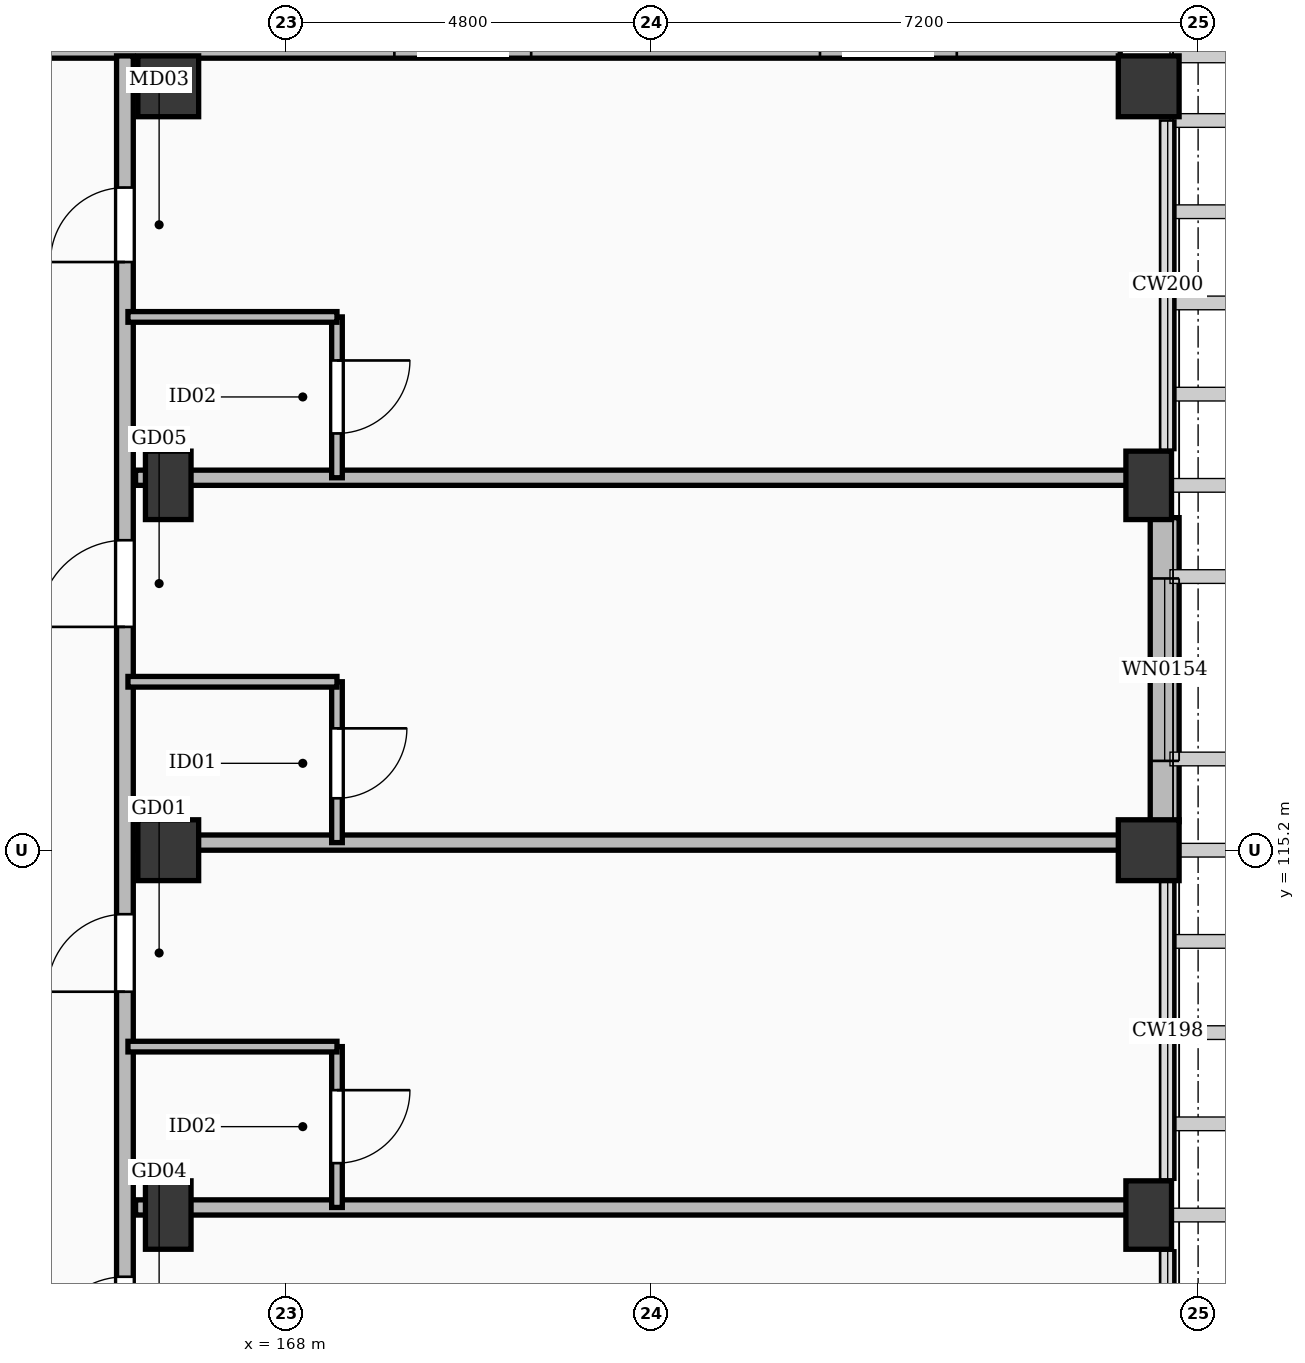
"""IFC4 building model, lengths in metres.
Left out: names, types, materials, properties, quantities, classifications, styles, units other than length and angle.
Written with IfcOpenShell. Run it as: python <this file> out.ifc"""

import sys

from ifc_helpers import new_model, si_unit, direction, frame, frame_2d, origin, origin_2d, place, context, subcontext, project, spatial, rectangle, extrude, element, fill, save


model = new_model("IFC4")
c1 = context("Model", 3, precision=1e-05, world=origin(), true_north=direction((0.0, 1.0)))
c2 = subcontext(c1, "Body", "Model", "MODEL_VIEW")
j1 = project(units=[si_unit("LENGTHUNIT", "METRE"), si_unit("PLANEANGLEUNIT", "RADIAN")], contexts=[c1])
p1 = place(None, origin())
s1 = spatial("IfcSite", under=j1, at=p1, CompositionType="ELEMENT")
p2 = place(p1, origin())
s2 = spatial("IfcBuilding", under=s1, at=p2, CompositionType="ELEMENT")
p3 = place(p2, frame((0.0, 0.0, 21.0)))
s3 = spatial("IfcBuildingStorey", under=s2, at=p3, CompositionType="ELEMENT", Elevation=21.0)
for number, where, z_axis, x_axis in (
    (1, (166.45, 115.2, 0.0), (0.0, 0.0, 1.0), (1.0, 0.0, 0.0)),
    (2, (166.45, 125.25, 0.0), (0.0, 0.0, 1.0), (1.0, 0.0, 0.0)),
    (3, (179.35, 115.2, 0.0), (0.0, 0.0, 1.0), (1.0, 0.0, 0.0)),
    (4, (179.35, 125.25, 0.0), (0.0, 0.0, 1.0), (1.0, 0.0, 0.0)),
):
    element("IfcColumn", number, at=place(p3, frame(where, z_axis=z_axis, x_axis=x_axis)), inside=s3, PredefinedType="COLUMN", context=c2, shape_type="SweptSolid", body=[
        extrude(rectangle(XDim=0.8, YDim=0.8, at=origin_2d()), origin(), (0.0, 0.0, 1.0), 3.6),
    ])
for number, where, z_axis, x_axis in (
    (5, (166.45, 110.4, -0.26), (0.0, 0.0, 1.0), (1.0, 0.0, 0.0)),
    (6, (166.45, 120.0, -0.26), (0.0, 0.0, 1.0), (1.0, 0.0, 0.0)),
    (7, (179.35, 110.4, -0.26), (0.0, 0.0, 1.0), (1.0, 0.0, 0.0)),
    (8, (179.35, 120.0, -0.26), (0.0, 0.0, 1.0), (1.0, 0.0, 0.0)),
):
    element("IfcColumn", number, at=place(p3, frame(where, z_axis=z_axis, x_axis=x_axis)), inside=s3, PredefinedType="COLUMN", context=c2, shape_type="SweptSolid", body=[
        extrude(rectangle(XDim=0.6, YDim=0.9, at=origin_2d()), origin(), (0.0, 0.0, 1.0), 3.86),
    ])
p4 = place(p3, frame((149.825, 125.81, 0.0), z_axis=(0.0, 0.0, 1.0), x_axis=(1.0, 0.0, 0.0)))
e9 = element("IfcWall", 9, at=p4, inside=s3, PredefinedType="SOLIDWALL", context=c2, shape_type="SweptSolid", body=[
    extrude(rectangle(XDim=29.15, YDim=0.38, at=frame_2d((14.575, 0.0))), origin(), (0.0, 0.0, 1.0), 3.34),
])
p5 = place(p4, frame((3.6, 0.0, 0.55)))
e10 = element("IfcOpeningElement", 10, at=p5, cuts=e9, PredefinedType="OPENING", context=c2, shape_type="SweptSolid", body=[
    extrude(rectangle(XDim=1.8, YDim=1.76, at=frame_2d((0.9, 0.88))), frame((0.0, 0.202, 0.0), z_axis=(0.0, -1.0, 0.0), x_axis=(1.0, 0.0, 0.0)), (0.0, 0.0, 1.0), 0.404),
])
p6 = place(p4, frame((9.2, 0.0, 0.55)))
e11 = element("IfcOpeningElement", 11, at=p6, cuts=e9, PredefinedType="OPENING", context=c2, shape_type="SweptSolid", body=[
    extrude(rectangle(XDim=1.8, YDim=1.76, at=frame_2d((0.9, 0.88))), frame((0.0, 0.202, 0.0), z_axis=(0.0, -1.0, 0.0), x_axis=(1.0, 0.0, 0.0)), (0.0, 0.0, 1.0), 0.404),
])
p7 = place(p4, frame((19.6, 0.0, 0.55)))
e12 = element("IfcOpeningElement", 12, at=p7, cuts=e9, PredefinedType="OPENING", context=c2, shape_type="SweptSolid", body=[
    extrude(rectangle(XDim=1.8, YDim=1.76, at=frame_2d((0.9, 0.88))), frame((0.0, 0.202, 0.0), z_axis=(0.0, -1.0, 0.0), x_axis=(1.0, 0.0, 0.0)), (0.0, 0.0, 1.0), 0.404),
])
p8 = place(p4, frame((25.2, 0.0, 0.55)))
e13 = element("IfcOpeningElement", 13, at=p8, cuts=e9, PredefinedType="OPENING", context=c2, shape_type="SweptSolid", body=[
    extrude(rectangle(XDim=1.8, YDim=1.76, at=frame_2d((0.9, 0.88))), frame((0.0, 0.202, 0.0), z_axis=(0.0, -1.0, 0.0), x_axis=(1.0, 0.0, 0.0)), (0.0, 0.0, 1.0), 0.404),
])
p9 = place(p3, frame((179.56, 119.575, 0.0), z_axis=(0.0, 0.0, 1.0), x_axis=(0.0, -1.0, 0.0)))
e14 = element("IfcWall", 14, at=p9, inside=s3, PredefinedType="SOLIDWALL", context=c2, shape_type="SweptSolid", body=[
    extrude(rectangle(XDim=4.0, YDim=0.38, at=frame_2d((2.0, 0.0))), origin(), (0.0, 0.0, 1.0), 2.582),
])
p10 = place(p9, frame((0.8, 0.0, 0.55)))
e15 = element("IfcOpeningElement", 15, at=p10, cuts=e14, PredefinedType="OPENING", context=c2, shape_type="SweptSolid", body=[
    extrude(rectangle(XDim=2.4, YDim=1.8, at=frame_2d((1.2, 0.9))), frame((0.0, 0.202, 0.0), z_axis=(0.0, -1.0, 0.0), x_axis=(1.0, 0.0, 0.0)), (0.0, 0.0, 1.0), 0.404),
])
p11 = place(p3, frame((165.88, 65.4, 0.0), z_axis=(0.0, 0.0, 1.0), x_axis=(0.0, 1.0, 0.0)))
e16 = element("IfcWall", 16, at=p11, inside=s3, PredefinedType="PARTITIONING", context=c2, shape_type="SweptSolid", body=[
    extrude(rectangle(XDim=60.25, YDim=0.22, at=frame_2d((30.125, 0.0))), origin(), (0.0, 0.0, 1.0), 2.582),
])
p12 = place(p11, frame((4.388, 0.0, 0.0)))
e17 = element("IfcOpeningElement", 17, at=p12, cuts=e16, PredefinedType="OPENING", context=c2, shape_type="SweptSolid", body=[
    extrude(rectangle(XDim=1.28, YDim=2.16, at=frame_2d((0.64, 1.08))), frame((0.0, 0.122, 0.0), z_axis=(0.0, -1.0, 0.0), x_axis=(1.0, 0.0, 0.0)), (0.0, 0.0, 1.0), 0.244),
])
p13 = place(p11, frame((9.538, 0.0, 0.0)))
e18 = element("IfcOpeningElement", 18, at=p13, cuts=e16, PredefinedType="OPENING", context=c2, shape_type="SweptSolid", body=[
    extrude(rectangle(XDim=0.9, YDim=2.08, at=frame_2d((0.45, 1.04))), frame((0.0, 0.122, 0.0), z_axis=(0.0, -1.0, 0.0), x_axis=(1.0, 0.0, 0.0)), (0.0, 0.0, 1.0), 0.244),
])
p14 = place(p11, frame((14.338, 0.0, 0.0)))
e19 = element("IfcOpeningElement", 19, at=p14, cuts=e16, PredefinedType="OPENING", context=c2, shape_type="SweptSolid", body=[
    extrude(rectangle(XDim=1.05, YDim=2.22, at=frame_2d((0.525, 1.11))), frame((0.0, 0.122, 0.0), z_axis=(0.0, -1.0, 0.0), x_axis=(1.0, 0.0, 0.0)), (0.0, 0.0, 1.0), 0.244),
])
p15 = place(p11, frame((19.138, 0.0, 0.0)))
e20 = element("IfcOpeningElement", 20, at=p15, cuts=e16, PredefinedType="OPENING", context=c2, shape_type="SweptSolid", body=[
    extrude(rectangle(XDim=1.02, YDim=2.2, at=frame_2d((0.51, 1.1))), frame((0.0, 0.122, 0.0), z_axis=(0.0, -1.0, 0.0), x_axis=(1.0, 0.0, 0.0)), (0.0, 0.0, 1.0), 0.244),
])
p16 = place(p11, frame((23.938, 0.0, 0.0)))
e21 = element("IfcOpeningElement", 21, at=p16, cuts=e16, PredefinedType="OPENING", context=c2, shape_type="SweptSolid", body=[
    extrude(rectangle(XDim=1.14, YDim=2.26, at=frame_2d((0.57, 1.13))), frame((0.0, 0.122, 0.0), z_axis=(0.0, -1.0, 0.0), x_axis=(1.0, 0.0, 0.0)), (0.0, 0.0, 1.0), 0.244),
])
p17 = place(p11, frame((28.738, 0.0, 0.0)))
e22 = element("IfcOpeningElement", 22, at=p17, cuts=e16, PredefinedType="OPENING", context=c2, shape_type="SweptSolid", body=[
    extrude(rectangle(XDim=0.98, YDim=2.15, at=frame_2d((0.49, 1.075))), frame((0.0, 0.122, 0.0), z_axis=(0.0, -1.0, 0.0), x_axis=(1.0, 0.0, 0.0)), (0.0, 0.0, 1.0), 0.244),
])
p18 = place(p11, frame((33.188, 0.0, 0.0)))
e23 = element("IfcOpeningElement", 23, at=p18, cuts=e16, PredefinedType="OPENING", context=c2, shape_type="SweptSolid", body=[
    extrude(rectangle(XDim=1.28, YDim=2.16, at=frame_2d((0.64, 1.08))), frame((0.0, 0.122, 0.0), z_axis=(0.0, -1.0, 0.0), x_axis=(1.0, 0.0, 0.0)), (0.0, 0.0, 1.0), 0.244),
])
p19 = place(p11, frame((38.338, 0.0, 0.0)))
e24 = element("IfcOpeningElement", 24, at=p19, cuts=e16, PredefinedType="OPENING", context=c2, shape_type="SweptSolid", body=[
    extrude(rectangle(XDim=0.9, YDim=2.08, at=frame_2d((0.45, 1.04))), frame((0.0, 0.122, 0.0), z_axis=(0.0, -1.0, 0.0), x_axis=(1.0, 0.0, 0.0)), (0.0, 0.0, 1.0), 0.244),
])
p20 = place(p11, frame((43.138, 0.0, 0.0)))
e25 = element("IfcOpeningElement", 25, at=p20, cuts=e16, PredefinedType="OPENING", context=c2, shape_type="SweptSolid", body=[
    extrude(rectangle(XDim=1.05, YDim=2.22, at=frame_2d((0.525, 1.11))), frame((0.0, 0.122, 0.0), z_axis=(0.0, -1.0, 0.0), x_axis=(1.0, 0.0, 0.0)), (0.0, 0.0, 1.0), 0.244),
])
p21 = place(p11, frame((47.938, 0.0, 0.0)))
e26 = element("IfcOpeningElement", 26, at=p21, cuts=e16, PredefinedType="OPENING", context=c2, shape_type="SweptSolid", body=[
    extrude(rectangle(XDim=1.02, YDim=2.2, at=frame_2d((0.51, 1.1))), frame((0.0, 0.122, 0.0), z_axis=(0.0, -1.0, 0.0), x_axis=(1.0, 0.0, 0.0)), (0.0, 0.0, 1.0), 0.244),
])
p22 = place(p11, frame((52.738, 0.0, 0.0)))
e27 = element("IfcOpeningElement", 27, at=p22, cuts=e16, PredefinedType="OPENING", context=c2, shape_type="SweptSolid", body=[
    extrude(rectangle(XDim=1.14, YDim=2.26, at=frame_2d((0.57, 1.13))), frame((0.0, 0.122, 0.0), z_axis=(0.0, -1.0, 0.0), x_axis=(1.0, 0.0, 0.0)), (0.0, 0.0, 1.0), 0.244),
])
p23 = place(p11, frame((57.538, 0.0, 0.0)))
e28 = element("IfcOpeningElement", 28, at=p23, cuts=e16, PredefinedType="OPENING", context=c2, shape_type="SweptSolid", body=[
    extrude(rectangle(XDim=0.98, YDim=2.15, at=frame_2d((0.49, 1.075))), frame((0.0, 0.122, 0.0), z_axis=(0.0, -1.0, 0.0), x_axis=(1.0, 0.0, 0.0)), (0.0, 0.0, 1.0), 0.244),
])
p24 = place(p3, frame((166.02, 110.5, 0.0), z_axis=(0.0, 0.0, 1.0), x_axis=(1.0, 0.0, 0.0)))
e29 = element("IfcWall", 29, at=p24, inside=s3, PredefinedType="PARTITIONING", context=c2, shape_type="SweptSolid", body=[
    extrude(rectangle(XDim=13.23, YDim=0.2, at=frame_2d((6.615, 0.0))), origin(), (0.0, 0.0, 1.0), 2.582),
])
p25 = place(p3, frame((168.67, 110.5, 0.0), z_axis=(0.0, 0.0, 1.0), x_axis=(0.0, 1.0, 0.0)))
e30 = element("IfcWall", 30, at=p25, inside=s3, PredefinedType="PARTITIONING", context=c2, shape_type="SweptSolid", body=[
    extrude(rectangle(XDim=2.116, YDim=0.14, at=frame_2d((1.058, 0.0))), origin(), (0.0, 0.0, 1.0), 2.652),
])
p26 = place(p25, frame((0.583, 0.0, 0.0)))
e31 = element("IfcOpeningElement", 31, at=p26, cuts=e30, PredefinedType="OPENING", context=c2, shape_type="SweptSolid", body=[
    extrude(rectangle(XDim=0.96, YDim=2.12, at=frame_2d((0.48, 1.06))), frame((0.0, 0.082, 0.0), z_axis=(0.0, -1.0, 0.0), x_axis=(1.0, 0.0, 0.0)), (0.0, 0.0, 1.0), 0.164),
])
p27 = place(p3, frame((165.92, 112.616, 0.0), z_axis=(0.0, 0.0, 1.0), x_axis=(1.0, 0.0, 0.0)))
e32 = element("IfcWall", 32, at=p27, inside=s3, PredefinedType="PARTITIONING", context=c2, shape_type="SweptSolid", body=[
    extrude(rectangle(XDim=2.75, YDim=0.14, at=frame_2d((1.375, 0.0))), origin(), (0.0, 0.0, 1.0), 2.652),
])
p28 = place(p3, frame((166.02, 115.3, 0.0), z_axis=(0.0, 0.0, 1.0), x_axis=(1.0, 0.0, 0.0)))
e33 = element("IfcWall", 33, at=p28, inside=s3, PredefinedType="PARTITIONING", context=c2, shape_type="SweptSolid", body=[
    extrude(rectangle(XDim=13.23, YDim=0.2, at=frame_2d((6.615, 0.0))), origin(), (0.0, 0.0, 1.0), 2.582),
])
p29 = place(p3, frame((168.67, 115.3, 0.0), z_axis=(0.0, 0.0, 1.0), x_axis=(0.0, 1.0, 0.0)))
e34 = element("IfcWall", 34, at=p29, inside=s3, PredefinedType="PARTITIONING", context=c2, shape_type="SweptSolid", body=[
    extrude(rectangle(XDim=2.116, YDim=0.14, at=frame_2d((1.058, 0.0))), origin(), (0.0, 0.0, 1.0), 2.652),
])
p30 = place(p29, frame((0.583, 0.0, 0.0)))
e35 = element("IfcOpeningElement", 35, at=p30, cuts=e34, PredefinedType="OPENING", context=c2, shape_type="SweptSolid", body=[
    extrude(rectangle(XDim=0.92, YDim=2.1, at=frame_2d((0.46, 1.05))), frame((0.0, 0.082, 0.0), z_axis=(0.0, -1.0, 0.0), x_axis=(1.0, 0.0, 0.0)), (0.0, 0.0, 1.0), 0.164),
])
p31 = place(p3, frame((165.92, 117.416, 0.0), z_axis=(0.0, 0.0, 1.0), x_axis=(1.0, 0.0, 0.0)))
e36 = element("IfcWall", 36, at=p31, inside=s3, PredefinedType="PARTITIONING", context=c2, shape_type="SweptSolid", body=[
    extrude(rectangle(XDim=2.75, YDim=0.14, at=frame_2d((1.375, 0.0))), origin(), (0.0, 0.0, 1.0), 2.652),
])
p32 = place(p3, frame((166.02, 120.1, 0.0), z_axis=(0.0, 0.0, 1.0), x_axis=(1.0, 0.0, 0.0)))
e37 = element("IfcWall", 37, at=p32, inside=s3, PredefinedType="PARTITIONING", context=c2, shape_type="SweptSolid", body=[
    extrude(rectangle(XDim=13.23, YDim=0.2, at=frame_2d((6.615, 0.0))), origin(), (0.0, 0.0, 1.0), 2.582),
])
p33 = place(p3, frame((168.67, 120.1, 0.0), z_axis=(0.0, 0.0, 1.0), x_axis=(0.0, 1.0, 0.0)))
e38 = element("IfcWall", 38, at=p33, inside=s3, PredefinedType="PARTITIONING", context=c2, shape_type="SweptSolid", body=[
    extrude(rectangle(XDim=2.116, YDim=0.14, at=frame_2d((1.058, 0.0))), origin(), (0.0, 0.0, 1.0), 2.652),
])
p34 = place(p33, frame((0.583, 0.0, 0.0)))
e39 = element("IfcOpeningElement", 39, at=p34, cuts=e38, PredefinedType="OPENING", context=c2, shape_type="SweptSolid", body=[
    extrude(rectangle(XDim=0.96, YDim=2.12, at=frame_2d((0.48, 1.06))), frame((0.0, 0.082, 0.0), z_axis=(0.0, -1.0, 0.0), x_axis=(1.0, 0.0, 0.0)), (0.0, 0.0, 1.0), 0.164),
])
p35 = place(p3, frame((165.92, 122.216, 0.0), z_axis=(0.0, 0.0, 1.0), x_axis=(1.0, 0.0, 0.0)))
e40 = element("IfcWall", 40, at=p35, inside=s3, PredefinedType="PARTITIONING", context=c2, shape_type="SweptSolid", body=[
    extrude(rectangle(XDim=2.75, YDim=0.14, at=frame_2d((1.375, 0.0))), origin(), (0.0, 0.0, 1.0), 2.652),
])
p36 = place(p10, origin())
e41 = element("IfcWindow", 41, at=p36, inside=s3, PartitioningType="SINGLE_PANEL", PredefinedType="WINDOW", context=c2, shape_type="SweptSolid", body=[
    extrude(rectangle(XDim=2.4, YDim=1.8, at=frame_2d((1.2, 0.9))), frame((0.0, 0.03, 0.0), z_axis=(0.0, -1.0, 0.0), x_axis=(1.0, 0.0, 0.0)), (0.0, 0.0, 1.0), 0.06),
])
fill(e15, e41)
p37 = place(p20, origin())
e42 = element("IfcDoor", 42, at=p37, inside=s3, OperationType="SINGLE_SWING_LEFT", PredefinedType="DOOR", context=c2, shape_type="SweptSolid", body=[
    extrude(rectangle(XDim=1.05, YDim=2.22, at=frame_2d((0.525, 1.11))), frame((0.0, 0.025, 0.0), z_axis=(0.0, -1.0, 0.0), x_axis=(1.0, 0.0, 0.0)), (0.0, 0.0, 1.0), 0.05),
])
fill(e25, e42)
p38 = place(p21, origin())
e43 = element("IfcDoor", 43, at=p38, inside=s3, OperationType="SINGLE_SWING_LEFT", PredefinedType="DOOR", context=c2, shape_type="SweptSolid", body=[
    extrude(rectangle(XDim=1.02, YDim=2.2, at=frame_2d((0.51, 1.1))), frame((0.0, 0.025, 0.0), z_axis=(0.0, -1.0, 0.0), x_axis=(1.0, 0.0, 0.0)), (0.0, 0.0, 1.0), 0.05),
])
fill(e26, e43)
p39 = place(p26, frame((0.96, 0.0, 0.0), z_axis=(0.0, 0.0, 1.0), x_axis=(-1.0, 0.0, 0.0)))
e44 = element("IfcDoor", 44, at=p39, inside=s3, OperationType="SINGLE_SWING_RIGHT", PredefinedType="DOOR", context=c2, shape_type="SweptSolid", body=[
    extrude(rectangle(XDim=0.96, YDim=2.12, at=frame_2d((0.48, 1.06))), frame((0.0, 0.025, 0.0), z_axis=(0.0, -1.0, 0.0), x_axis=(1.0, 0.0, 0.0)), (0.0, 0.0, 1.0), 0.05),
])
fill(e31, e44)
p40 = place(p22, origin())
e45 = element("IfcDoor", 45, at=p40, inside=s3, OperationType="SINGLE_SWING_LEFT", PredefinedType="DOOR", context=c2, shape_type="SweptSolid", body=[
    extrude(rectangle(XDim=1.14, YDim=2.26, at=frame_2d((0.57, 1.13))), frame((0.0, 0.025, 0.0), z_axis=(0.0, -1.0, 0.0), x_axis=(1.0, 0.0, 0.0)), (0.0, 0.0, 1.0), 0.05),
])
fill(e27, e45)
p41 = place(p30, frame((0.92, 0.0, 0.0), z_axis=(0.0, 0.0, 1.0), x_axis=(-1.0, 0.0, 0.0)))
e46 = element("IfcDoor", 46, at=p41, inside=s3, OperationType="SINGLE_SWING_RIGHT", PredefinedType="DOOR", context=c2, shape_type="SweptSolid", body=[
    extrude(rectangle(XDim=0.92, YDim=2.1, at=frame_2d((0.46, 1.05))), frame((0.0, 0.025, 0.0), z_axis=(0.0, -1.0, 0.0), x_axis=(1.0, 0.0, 0.0)), (0.0, 0.0, 1.0), 0.05),
])
fill(e35, e46)
p42 = place(p23, origin())
e47 = element("IfcDoor", 47, at=p42, inside=s3, OperationType="SINGLE_SWING_LEFT", PredefinedType="DOOR", context=c2, shape_type="SweptSolid", body=[
    extrude(rectangle(XDim=0.98, YDim=2.15, at=frame_2d((0.49, 1.075))), frame((0.0, 0.025, 0.0), z_axis=(0.0, -1.0, 0.0), x_axis=(1.0, 0.0, 0.0)), (0.0, 0.0, 1.0), 0.05),
])
fill(e28, e47)
p43 = place(p34, frame((0.96, 0.0, 0.0), z_axis=(0.0, 0.0, 1.0), x_axis=(-1.0, 0.0, 0.0)))
e48 = element("IfcDoor", 48, at=p43, inside=s3, OperationType="SINGLE_SWING_RIGHT", PredefinedType="DOOR", context=c2, shape_type="SweptSolid", body=[
    extrude(rectangle(XDim=0.96, YDim=2.12, at=frame_2d((0.48, 1.06))), frame((0.0, 0.025, 0.0), z_axis=(0.0, -1.0, 0.0), x_axis=(1.0, 0.0, 0.0)), (0.0, 0.0, 1.0), 0.05),
])
fill(e39, e48)
save(model, sys.argv[1])
